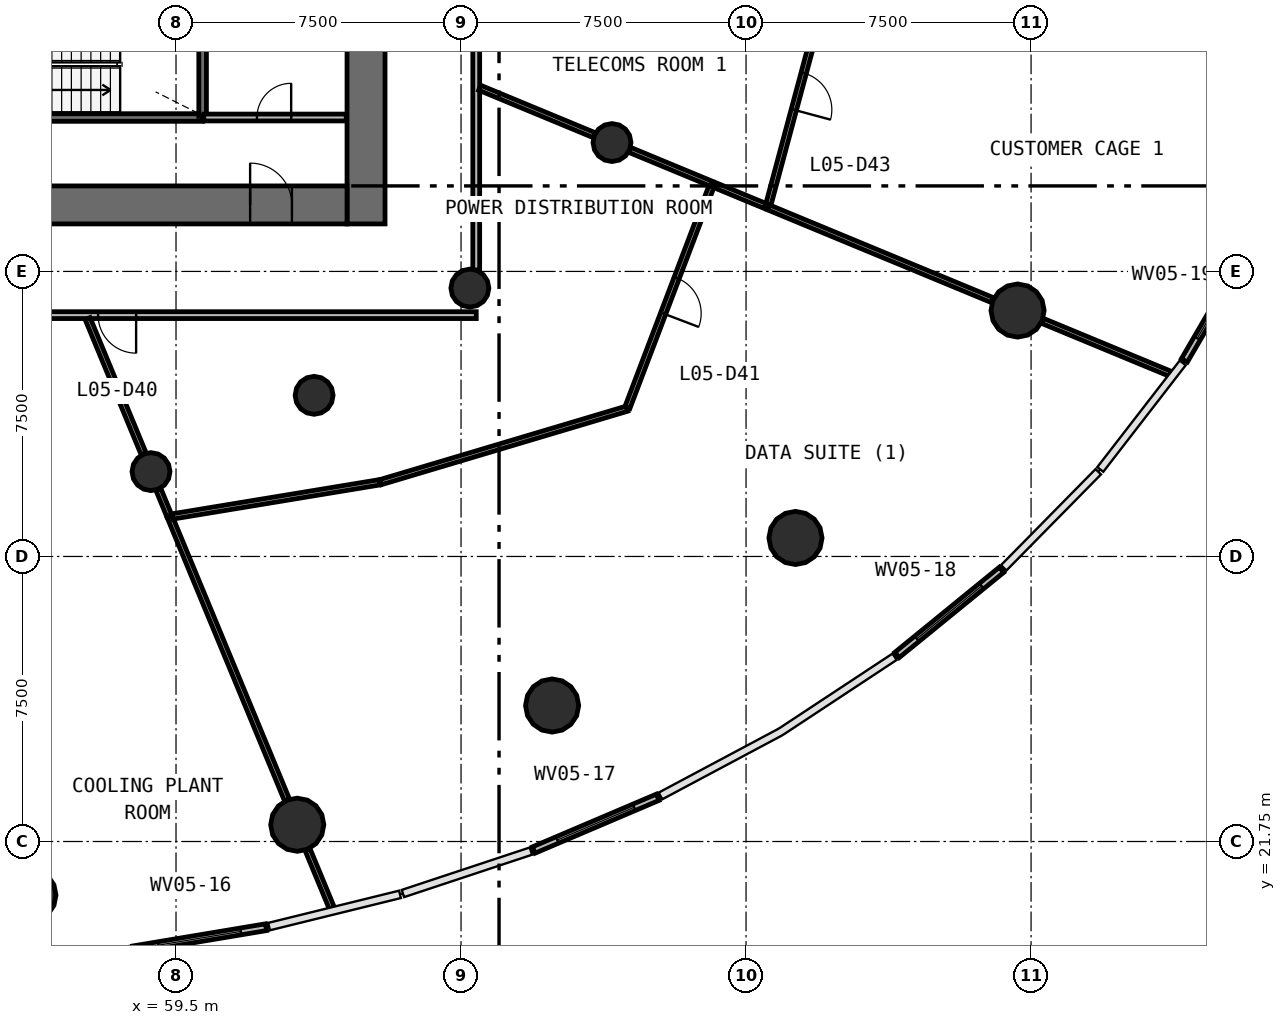
"""IFC4 building model, lengths in metres.
Left out: names, types, materials, properties, quantities, classifications, styles, units other than length and angle.
Written with IfcOpenShell. Run it as: python <this file> out.ifc"""

import sys

from ifc_helpers import new_model, si_unit, direction, frame, frame_2d, origin, origin_2d, place, context, subcontext, project, spatial, rectangle, circle, extrude, source, transform, mapped, element, fill, save


model = new_model("IFC4")
c1 = context("Model", 3, precision=1e-05, world=origin(), true_north=direction((0.0, 1.0)))
c2 = subcontext(c1, "Body", "Model", "MODEL_VIEW")
j1 = project(units=[si_unit("LENGTHUNIT", "METRE"), si_unit("PLANEANGLEUNIT", "RADIAN")], contexts=[c1])
p1 = place(None, origin())
s1 = spatial("IfcSite", under=j1, at=p1, CompositionType="ELEMENT")
p2 = place(p1, origin())
s2 = spatial("IfcBuilding", under=s1, at=p2, CompositionType="ELEMENT")
p3 = place(p2, frame((0.0, 0.0, 22.6)))
s3 = spatial("IfcBuildingStorey", under=s2, at=p3, CompositionType="ELEMENT", Elevation=22.6)
p4 = place(p3, frame((64.5, 38.0, 0.0), z_axis=(0.0, 0.0, 1.0), x_axis=(0.0, 1.0, 0.0)))
e1 = element("IfcWall", 1, at=p4, inside=s3, PredefinedType="SHEAR", context=c2, shape_type="SweptSolid", body=[
    extrude(rectangle(XDim=20.0, YDim=1.0, at=frame_2d((10.0, 0.0))), origin(), (0.0, 0.0, 1.0), 4.4),
])
p5 = place(p4, frame((9.1, 0.0, 0.0)))
e2 = element("IfcOpeningElement", 2, at=p5, cuts=e1, PredefinedType="OPENING", context=c2, shape_type="SweptSolid", body=[
    extrude(rectangle(XDim=1.8, YDim=2.1, at=frame_2d((0.9, 1.05))), frame((0.0, 0.51, 0.0), z_axis=(0.0, -1.0, 0.0), x_axis=(1.0, 0.0, 0.0)), (0.0, 0.0, 1.0), 1.02),
])
p6 = place(p3, frame((40.0, 38.5, 0.0), z_axis=(0.0, 0.0, 1.0), x_axis=(1.0, 0.0, 0.0)))
e3 = element("IfcWall", 3, at=p6, inside=s3, PredefinedType="SHEAR", context=c2, shape_type="SweptSolid", body=[
    extrude(rectangle(XDim=24.0, YDim=1.0, at=frame_2d((12.0, 0.0))), origin(), (0.0, 0.0, 1.0), 4.4),
])
p7 = place(p6, frame((21.45, 0.0, 0.0)))
e4 = element("IfcOpeningElement", 4, at=p7, cuts=e3, PredefinedType="OPENING", context=c2, shape_type="SweptSolid", body=[
    extrude(rectangle(XDim=1.1, YDim=2.1, at=frame_2d((0.55, 1.05))), frame((0.0, 0.51, 0.0), z_axis=(0.0, -1.0, 0.0), x_axis=(1.0, 0.0, 0.0)), (0.0, 0.0, 1.0), 1.02),
])
p8 = place(p6, frame((1.95, 0.0, 0.0)))
e5 = element("IfcOpeningElement", 5, at=p8, cuts=e3, PredefinedType="OPENING", context=c2, shape_type="SweptSolid", body=[
    extrude(rectangle(XDim=1.1, YDim=2.1, at=frame_2d((0.55, 1.05))), frame((0.0, 0.51, 0.0), z_axis=(0.0, -1.0, 0.0), x_axis=(1.0, 0.0, 0.0)), (0.0, 0.0, 1.0), 1.02),
])
m1 = source(origin(), c2, "Body", "SweptSolid", [
    extrude(circle(Radius=0.7, at=origin_2d()), origin(), (0.0, 0.0, 1.0), 4.4),
])
for number, where, z_axis, x_axis in (
    (6, (55.642, 20.339, 0.0), (0.0, 0.0, 1.0), (1.0, 0.0, 0.0)),
    (7, (62.69, 22.191, 0.0), (0.0, 0.0, 1.0), (1.0, 0.0, 0.0)),
    (8, (69.396, 25.328, 0.0), (0.0, 0.0, 1.0), (1.0, 0.0, 0.0)),
    (9, (75.801, 29.737, 0.0), (0.0, 0.0, 1.0), (1.0, 0.0, 0.0)),
    (10, (81.645, 35.721, 0.0), (0.0, 0.0, 1.0), (1.0, 0.0, 0.0)),
):
    element("IfcColumn", number, at=place(p3, frame(where, z_axis=z_axis, x_axis=x_axis)), inside=s3, PredefinedType="COLUMN", context=c2, shape_type="MappedRepresentation", body=[
        mapped(m1, transform((0.0, 0.0, 0.0), scale=1.0)),
    ])
m2 = source(origin(), c2, "Body", "SweptSolid", [
    extrude(circle(Radius=0.5, at=origin_2d()), origin(), (0.0, 0.0, 1.0), 4.4),
])
for number, where, z_axis, x_axis in (
    (11, (58.842, 31.482, 0.0), (0.0, 0.0, 1.0), (1.0, 0.0, 0.0)),
    (12, (63.134, 33.49, 0.0), (0.0, 0.0, 1.0), (1.0, 0.0, 0.0)),
    (13, (67.232, 36.312, 0.0), (0.0, 0.0, 1.0), (1.0, 0.0, 0.0)),
    (14, (70.972, 40.141, 0.0), (0.0, 0.0, 1.0), (1.0, 0.0, 0.0)),
):
    element("IfcColumn", number, at=place(p3, frame(where, z_axis=z_axis, x_axis=x_axis)), inside=s3, PredefinedType="COLUMN", context=c2, shape_type="MappedRepresentation", body=[
        mapped(m2, transform((0.0, 0.0, 0.0), scale=1.0)),
    ])
p9 = place(p3, frame((58.372, 18.912, 0.0), z_axis=(0.0, 0.0, 1.0), x_axis=(0.986367870411, 0.164555231521, 0.0)))
e15 = element("IfcWall", 15, at=p9, inside=s3, PredefinedType="STANDARD", context=c2, shape_type="SweptSolid", body=[
    extrude(rectangle(XDim=3.547, YDim=0.18, at=frame_2d((1.774, 0.0))), origin(), (0.0, 0.0, 1.0), 3.95),
])
p10 = place(p9, frame((0.674, 0.0, 0.9)))
e16 = element("IfcOpeningElement", 16, at=p10, cuts=e15, PredefinedType="OPENING", context=c2, shape_type="SweptSolid", body=[
    extrude(rectangle(XDim=2.2, YDim=2.2, at=frame_2d((1.1, 1.1))), frame((0.0, 0.1, 0.0), z_axis=(0.0, -1.0, 0.0), x_axis=(1.0, 0.0, 0.0)), (0.0, 0.0, 1.0), 0.2),
])
p11 = place(p3, frame((68.912, 21.525, 0.0), z_axis=(0.0, 0.0, 1.0), x_axis=(0.920153052776, 0.391558883779, 0.0)))
e17 = element("IfcWall", 17, at=p11, inside=s3, PredefinedType="STANDARD", context=c2, shape_type="SweptSolid", body=[
    extrude(rectangle(XDim=3.547, YDim=0.18, at=frame_2d((1.773, 0.0))), origin(), (0.0, 0.0, 1.0), 3.95),
])
p12 = place(p11, frame((0.674, 0.0, 0.9)))
e18 = element("IfcOpeningElement", 18, at=p12, cuts=e17, PredefinedType="OPENING", context=c2, shape_type="SweptSolid", body=[
    extrude(rectangle(XDim=2.2, YDim=2.2, at=frame_2d((1.1, 1.1))), frame((0.0, 0.1, 0.0), z_axis=(0.0, -1.0, 0.0), x_axis=(1.0, 0.0, 0.0)), (0.0, 0.0, 1.0), 0.2),
])
p13 = place(p3, frame((78.472, 26.658, 0.0), z_axis=(0.0, 0.0, 1.0), x_axis=(0.775283676783, 0.631613188997, 0.0)))
e19 = element("IfcWall", 19, at=p13, inside=s3, PredefinedType="STANDARD", context=c2, shape_type="SweptSolid", body=[
    extrude(rectangle(XDim=3.546, YDim=0.18, at=frame_2d((1.773, 0.0))), origin(), (0.0, 0.0, 1.0), 3.95),
])
p14 = place(p13, frame((0.673, 0.0, 0.9)))
e20 = element("IfcOpeningElement", 20, at=p14, cuts=e19, PredefinedType="OPENING", context=c2, shape_type="SweptSolid", body=[
    extrude(rectangle(XDim=2.2, YDim=2.2, at=frame_2d((1.1, 1.1))), frame((0.0, 0.1, 0.0), z_axis=(0.0, -1.0, 0.0), x_axis=(1.0, 0.0, 0.0)), (0.0, 0.0, 1.0), 0.2),
])
p15 = place(p3, frame((86.035, 34.41, 0.0), z_axis=(0.0, 0.0, 1.0), x_axis=(0.503905275905, 0.8637589206, 0.0)))
e21 = element("IfcWall", 21, at=p15, inside=s3, PredefinedType="STANDARD", context=c2, shape_type="SweptSolid", body=[
    extrude(rectangle(XDim=3.546, YDim=0.18, at=frame_2d((1.773, 0.0))), origin(), (0.0, 0.0, 1.0), 3.95),
])
p16 = place(p15, frame((0.673, 0.0, 0.9)))
e22 = element("IfcOpeningElement", 22, at=p16, cuts=e21, PredefinedType="OPENING", context=c2, shape_type="SweptSolid", body=[
    extrude(rectangle(XDim=2.2, YDim=2.2, at=frame_2d((1.1, 1.1))), frame((0.0, 0.1, 0.0), z_axis=(0.0, -1.0, 0.0), x_axis=(1.0, 0.0, 0.0)), (0.0, 0.0, 1.0), 0.2),
])
p17 = place(p3, frame((53.6, 40.8, 0.0), z_axis=(0.0, 0.0, 1.0), x_axis=(1.0, 0.0, 0.0)))
e23 = element("IfcWall", 23, at=p17, inside=s3, PredefinedType="SOLIDWALL", context=c2, shape_type="SweptSolid", body=[
    extrude(rectangle(XDim=6.6, YDim=0.2, at=frame_2d((3.3, 0.0))), origin(), (0.0, 0.0, 1.0), 3.95),
])
p18 = place(p17, frame((0.3, 0.0, 0.0)))
e24 = element("IfcOpeningElement", 24, at=p18, cuts=e23, PredefinedType="OPENING", context=c2, shape_type="SweptSolid", body=[
    extrude(rectangle(XDim=1.2, YDim=2.1, at=frame_2d((0.6, 1.05))), frame((0.0, 0.11, 0.0), z_axis=(0.0, -1.0, 0.0), x_axis=(1.0, 0.0, 0.0)), (0.0, 0.0, 1.0), 0.22),
])
p19 = place(p3, frame((60.2, 40.83, 0.0), z_axis=(0.0, 0.0, 1.0), x_axis=(0.0, 1.0, 0.0)))
e25 = element("IfcWall", 25, at=p19, inside=s3, PredefinedType="SOLIDWALL", context=c2, shape_type="SweptSolid", body=[
    extrude(rectangle(XDim=2.77, YDim=0.2, at=frame_2d((1.385, 0.0))), origin(), (0.0, 0.0, 1.0), 3.95),
])
p20 = place(p3, frame((67.4, 35.6, 0.0), z_axis=(0.0, 0.0, 1.0), x_axis=(-1.0, 0.0, 0.0)))
e26 = element("IfcWall", 26, at=p20, inside=s3, PredefinedType="PARTITIONING", context=c2, shape_type="SweptSolid", body=[
    extrude(rectangle(XDim=30.8, YDim=0.18, at=frame_2d((15.4, 0.0))), origin(), (0.0, 0.0, 1.0), 3.05),
])
p21 = place(p20, frame((14.95, 0.0, 0.0)))
e27 = element("IfcOpeningElement", 27, at=p21, cuts=e26, PredefinedType="OPENING", context=c2, shape_type="SweptSolid", body=[
    extrude(rectangle(XDim=1.0, YDim=2.1, at=frame_2d((0.5, 1.05))), frame((0.0, 0.1, 0.0), z_axis=(0.0, -1.0, 0.0), x_axis=(1.0, 0.0, 0.0)), (0.0, 0.0, 1.0), 0.2),
])
p22 = place(p20, frame((12.55, 0.0, 0.0)))
e28 = element("IfcOpeningElement", 28, at=p22, cuts=e26, PredefinedType="OPENING", context=c2, shape_type="SweptSolid", body=[
    extrude(rectangle(XDim=1.0, YDim=2.1, at=frame_2d((0.5, 1.05))), frame((0.0, 0.1, 0.0), z_axis=(0.0, -1.0, 0.0), x_axis=(1.0, 0.0, 0.0)), (0.0, 0.0, 1.0), 0.2),
])
p23 = place(p20, frame((8.95, 0.0, 0.0)))
e29 = element("IfcOpeningElement", 29, at=p23, cuts=e26, PredefinedType="OPENING", context=c2, shape_type="SweptSolid", body=[
    extrude(rectangle(XDim=1.0, YDim=2.1, at=frame_2d((0.5, 1.05))), frame((0.0, 0.1, 0.0), z_axis=(0.0, -1.0, 0.0), x_axis=(1.0, 0.0, 0.0)), (0.0, 0.0, 1.0), 0.2),
])
p24 = place(p3, frame((67.4, 60.37, 0.0), z_axis=(0.0, 0.0, 1.0), x_axis=(0.0, -1.0, 0.0)))
e30 = element("IfcWall", 30, at=p24, inside=s3, PredefinedType="PARTITIONING", context=c2, shape_type="SweptSolid", body=[
    extrude(rectangle(XDim=23.583, YDim=0.18, at=frame_2d((11.791, 0.0))), origin(), (0.0, 0.0, 1.0), 3.05),
])
p25 = place(p24, frame((11.333, 0.0, 0.0)))
e31 = element("IfcOpeningElement", 31, at=p25, cuts=e30, PredefinedType="OPENING", context=c2, shape_type="SweptSolid", body=[
    extrude(rectangle(XDim=1.0, YDim=2.1, at=frame_2d((0.5, 1.05))), frame((0.0, 0.1, 0.0), z_axis=(0.0, -1.0, 0.0), x_axis=(1.0, 0.0, 0.0)), (0.0, 0.0, 1.0), 0.2),
])
p26 = place(p24, frame((4.633, 0.0, 0.0)))
e32 = element("IfcOpeningElement", 32, at=p26, cuts=e30, PredefinedType="OPENING", context=c2, shape_type="SweptSolid", body=[
    extrude(rectangle(XDim=0.9, YDim=2.1, at=frame_2d((0.45, 1.05))), frame((0.0, 0.1, 0.0), z_axis=(0.0, -1.0, 0.0), x_axis=(1.0, 0.0, 0.0)), (0.0, 0.0, 1.0), 0.2),
])
p27 = place(p24, frame((1.232, 0.0, 0.0)))
e33 = element("IfcOpeningElement", 33, at=p27, cuts=e30, PredefinedType="OPENING", context=c2, shape_type="SweptSolid", body=[
    extrude(rectangle(XDim=0.9, YDim=2.1, at=frame_2d((0.45, 1.05))), frame((0.0, 0.1, 0.0), z_axis=(0.0, -1.0, 0.0), x_axis=(1.0, 0.0, 0.0)), (0.0, 0.0, 1.0), 0.2),
])
p28 = place(p24, frame((14.732, 0.0, 0.0)))
e34 = element("IfcOpeningElement", 34, at=p28, cuts=e30, PredefinedType="OPENING", context=c2, shape_type="SweptSolid", body=[
    extrude(rectangle(XDim=1.0, YDim=2.1, at=frame_2d((0.5, 1.05))), frame((0.0, 0.1, 0.0), z_axis=(0.0, -1.0, 0.0), x_axis=(1.0, 0.0, 0.0)), (0.0, 0.0, 1.0), 0.2),
])
p29 = place(p3, frame((60.23, 40.8, 0.0), z_axis=(0.0, 0.0, 1.0), x_axis=(1.0, 0.0, 0.0)))
e35 = element("IfcWall", 35, at=p29, inside=s3, PredefinedType="PARTITIONING", context=c2, shape_type="SweptSolid", body=[
    extrude(rectangle(XDim=3.75, YDim=0.18, at=frame_2d((1.875, 0.0))), origin(), (0.0, 0.0, 1.0), 3.95),
])
p30 = place(p29, frame((1.4, 0.0, 0.0)))
e36 = element("IfcOpeningElement", 36, at=p30, cuts=e35, PredefinedType="OPENING", context=c2, shape_type="SweptSolid", body=[
    extrude(rectangle(XDim=0.9, YDim=2.1, at=frame_2d((0.45, 1.05))), frame((0.0, 0.1, 0.0), z_axis=(0.0, -1.0, 0.0), x_axis=(1.0, 0.0, 0.0)), (0.0, 0.0, 1.0), 0.2),
])
p31 = place(p3, frame((59.335, 30.291, 0.0), z_axis=(0.0, 0.0, 1.0), x_axis=(0.38267718825, -0.923882118884, 0.0)))
e37 = element("IfcWall", 37, at=p31, inside=s3, PredefinedType="PARTITIONING", context=c2, shape_type="SweptSolid", body=[
    extrude(rectangle(XDim=8.062, YDim=0.14, at=frame_2d((4.031, 0.0))), origin(), (0.0, 0.0, 1.0), 3.05),
])
p32 = place(p3, frame((64.886, 31.206, 0.0), z_axis=(0.0, 0.0, 1.0), x_axis=(0.958287066923, 0.285807448063, 0.0)))
e38 = element("IfcWall", 38, at=p32, inside=s3, PredefinedType="PARTITIONING", context=c2, shape_type="SweptSolid", body=[
    extrude(rectangle(XDim=6.763, YDim=0.14, at=frame_2d((3.381, 0.0))), origin(), (0.0, 0.0, 1.0), 3.05),
])
p33 = place(p3, frame((76.754, 44.711, 0.0), z_axis=(0.0, 0.0, 1.0), x_axis=(-0.259521453513, -0.965737342742, 0.0)))
e39 = element("IfcWall", 39, at=p33, inside=s3, PredefinedType="PARTITIONING", context=c2, shape_type="SweptSolid", body=[
    extrude(rectangle(XDim=6.489, YDim=0.14, at=frame_2d((3.245, 0.0))), origin(), (0.0, 0.0, 1.0), 3.05),
])
p34 = place(p33, frame((2.839, 0.0, 0.0)))
e40 = element("IfcOpeningElement", 40, at=p34, cuts=e39, PredefinedType="OPENING", context=c2, shape_type="SweptSolid", body=[
    extrude(rectangle(XDim=1.0, YDim=2.1, at=frame_2d((0.5, 1.05))), frame((0.0, 0.08, 0.0), z_axis=(0.0, -1.0, 0.0), x_axis=(1.0, 0.0, 0.0)), (0.0, 0.0, 1.0), 0.16),
])
p35 = place(p3, frame((75.097, 38.433, 0.0), z_axis=(0.0, 0.0, 1.0), x_axis=(0.923869490045, -0.382707676125, 0.0)))
e41 = element("IfcWall", 41, at=p35, inside=s3, PredefinedType="PARTITIONING", context=c2, shape_type="SweptSolid", body=[
    extrude(rectangle(XDim=6.382, YDim=0.14, at=frame_2d((3.191, 0.0))), origin(), (0.0, 0.0, 1.0), 3.05),
])
p36 = place(p3, frame((73.613, 39.048, 0.0), z_axis=(0.0, 0.0, 1.0), x_axis=(-0.355249637072, -0.934771466916, 0.0)))
e42 = element("IfcWall", 42, at=p36, inside=s3, PredefinedType="PARTITIONING", context=c2, shape_type="SweptSolid", body=[
    extrude(rectangle(XDim=6.291, YDim=0.14, at=frame_2d((3.146, 0.0))), origin(), (0.0, 0.0, 1.0), 3.05),
])
p37 = place(p36, frame((2.641, 0.0, 0.0)))
e43 = element("IfcOpeningElement", 43, at=p37, cuts=e42, PredefinedType="OPENING", context=c2, shape_type="SweptSolid", body=[
    extrude(rectangle(XDim=1.0, YDim=2.1, at=frame_2d((0.5, 1.05))), frame((0.0, 0.08, 0.0), z_axis=(0.0, -1.0, 0.0), x_axis=(1.0, 0.0, 0.0)), (0.0, 0.0, 1.0), 0.16),
])
p38 = place(p3, frame((59.406, 30.303, 0.0), z_axis=(0.0, 0.0, 1.0), x_axis=(0.986685012905, 0.162642815117, 0.0)))
e44 = element("IfcWall", 44, at=p38, inside=s3, PredefinedType="PARTITIONING", context=c2, shape_type="SweptSolid", body=[
    extrude(rectangle(XDim=5.524, YDim=0.14, at=frame_2d((2.762, 0.0))), origin(), (0.0, 0.0, 1.0), 3.05),
])
p39 = place(p3, frame((57.174, 35.51, 0.0), z_axis=(0.0, 0.0, 1.0), x_axis=(0.382644558062, -0.923895633817, 0.0)))
e45 = element("IfcWall", 45, at=p39, inside=s3, PredefinedType="PARTITIONING", context=c2, shape_type="SweptSolid", body=[
    extrude(rectangle(XDim=3.854, YDim=0.14, at=frame_2d((1.927, 0.0))), origin(), (0.0, 0.0, 1.0), 3.05),
])
p40 = place(p3, frame((82.296, 35.451, 0.0), z_axis=(0.0, 0.0, 1.0), x_axis=(0.923882033439, -0.382677394537, 0.0)))
e46 = element("IfcWall", 46, at=p40, inside=s3, PredefinedType="PARTITIONING", context=c2, shape_type="SweptSolid", body=[
    extrude(rectangle(XDim=3.642, YDim=0.14, at=frame_2d((1.821, 0.0))), origin(), (0.0, 0.0, 1.0), 3.05),
])
p41 = place(p3, frame((67.49, 41.584, 0.0), z_axis=(0.0, 0.0, 1.0), x_axis=(0.923911109142, -0.382607190737, 0.0)))
e47 = element("IfcWall", 47, at=p41, inside=s3, PredefinedType="PARTITIONING", context=c2, shape_type="SweptSolid", body=[
    extrude(rectangle(XDim=3.264, YDim=0.14, at=frame_2d((1.632, 0.0))), origin(), (0.0, 0.0, 1.0), 3.05),
])
p42 = place(p3, frame((71.439, 39.948, 0.0), z_axis=(0.0, 0.0, 1.0), x_axis=(0.923861804277, -0.382726229306, 0.0)))
e48 = element("IfcWall", 48, at=p42, inside=s3, PredefinedType="PARTITIONING", context=c2, shape_type="SweptSolid", body=[
    extrude(rectangle(XDim=2.323, YDim=0.14, at=frame_2d((1.161, 0.0))), origin(), (0.0, 0.0, 1.0), 3.05),
])
p43 = place(p3, frame((62.96, 21.54, 0.0), z_axis=(0.0, 0.0, 1.0), x_axis=(0.382571117301, -0.923926046936, 0.0)))
e49 = element("IfcWall", 49, at=p43, inside=s3, PredefinedType="PARTITIONING", context=c2, shape_type="SweptSolid", body=[
    extrude(rectangle(XDim=1.671, YDim=0.14, at=frame_2d((0.836, 0.0))), origin(), (0.0, 0.0, 1.0), 3.05),
])
p44 = place(p3, frame((73.677, 39.021, 0.0), z_axis=(0.0, 0.0, 1.0), x_axis=(0.923859397542, -0.382732038864, 0.0)))
e50 = element("IfcWall", 50, at=p44, inside=s3, PredefinedType="PARTITIONING", context=c2, shape_type="SweptSolid", body=[
    extrude(rectangle(XDim=1.437, YDim=0.14, at=frame_2d((0.718, 0.0))), origin(), (0.0, 0.0, 1.0), 3.05),
])
p45 = place(p3, frame((59.035, 31.016, 0.0), z_axis=(0.0, 0.0, 1.0), x_axis=(0.382799508823, -0.923831443525, 0.0)))
e51 = element("IfcWall", 51, at=p45, inside=s3, PredefinedType="PARTITIONING", context=c2, shape_type="SweptSolid", body=[
    extrude(rectangle(XDim=0.754, YDim=0.14, at=frame_2d((0.377, 0.0))), origin(), (0.0, 0.0, 1.0), 3.05),
])
m3 = source(origin(), c2, "Body", "SweptSolid", [
    extrude(rectangle(XDim=2.2, YDim=2.2, at=frame_2d((1.1, 1.1))), frame((0.0, 0.03, 0.0), z_axis=(0.0, -1.0, 0.0), x_axis=(1.0, 0.0, 0.0)), (0.0, 0.0, 1.0), 0.06),
])
p46 = place(p10, origin())
e52 = element("IfcWindow", 52, at=p46, inside=s3, PartitioningType="SINGLE_PANEL", PredefinedType="WINDOW", context=c2, shape_type="MappedRepresentation", body=[
    mapped(m3, transform((0.0, 0.0, 0.0), scale=1.0)),
])
fill(e16, e52)
p47 = place(p12, origin())
e53 = element("IfcWindow", 53, at=p47, inside=s3, PartitioningType="SINGLE_PANEL", PredefinedType="WINDOW", context=c2, shape_type="MappedRepresentation", body=[
    mapped(m3, transform((0.0, 0.0, 0.0), scale=1.0)),
])
fill(e18, e53)
p48 = place(p14, origin())
e54 = element("IfcWindow", 54, at=p48, inside=s3, PartitioningType="SINGLE_PANEL", PredefinedType="WINDOW", context=c2, shape_type="MappedRepresentation", body=[
    mapped(m3, transform((0.0, 0.0, 0.0), scale=1.0)),
])
fill(e20, e54)
p49 = place(p16, origin())
e55 = element("IfcWindow", 55, at=p49, inside=s3, PartitioningType="SINGLE_PANEL", PredefinedType="WINDOW", context=c2, shape_type="MappedRepresentation", body=[
    mapped(m3, transform((0.0, 0.0, 0.0), scale=1.0)),
])
fill(e22, e55)
m4 = source(origin(), c2, "Body", "SweptSolid", [
    extrude(rectangle(XDim=1.1, YDim=2.1, at=frame_2d((0.55, 1.05))), frame((0.0, 0.025, 0.0), z_axis=(0.0, -1.0, 0.0), x_axis=(1.0, 0.0, 0.0)), (0.0, 0.0, 1.0), 0.05),
])
p50 = place(p7, origin())
e56 = element("IfcDoor", 56, at=p50, inside=s3, OperationType="SINGLE_SWING_LEFT", PredefinedType="DOOR", context=c2, shape_type="MappedRepresentation", body=[
    mapped(m4, transform((0.0, 0.0, 0.0), scale=1.0)),
])
fill(e4, e56)
m5 = source(origin(), c2, "Body", "SweptSolid", [
    extrude(rectangle(XDim=1.0, YDim=2.1, at=frame_2d((0.5, 1.05))), frame((0.0, 0.025, 0.0), z_axis=(0.0, -1.0, 0.0), x_axis=(1.0, 0.0, 0.0)), (0.0, 0.0, 1.0), 0.05),
])
p51 = place(p23, origin())
e57 = element("IfcDoor", 57, at=p51, inside=s3, OperationType="SINGLE_SWING_LEFT", PredefinedType="DOOR", context=c2, shape_type="MappedRepresentation", body=[
    mapped(m5, transform((0.0, 0.0, 0.0), scale=1.0)),
])
fill(e29, e57)
p52 = place(p37, origin())
e58 = element("IfcDoor", 58, at=p52, inside=s3, OperationType="SINGLE_SWING_RIGHT", PredefinedType="DOOR", context=c2, shape_type="MappedRepresentation", body=[
    mapped(m5, transform((0.0, 0.0, 0.0), scale=1.0)),
])
fill(e43, e58)
p53 = place(p34, origin())
e59 = element("IfcDoor", 59, at=p53, inside=s3, OperationType="SINGLE_SWING_RIGHT", PredefinedType="DOOR", context=c2, shape_type="MappedRepresentation", body=[
    mapped(m5, transform((0.0, 0.0, 0.0), scale=1.0)),
])
fill(e40, e59)
m6 = source(origin(), c2, "Body", "SweptSolid", [
    extrude(rectangle(XDim=0.9, YDim=2.1, at=frame_2d((0.45, 1.05))), frame((0.0, 0.025, 0.0), z_axis=(0.0, -1.0, 0.0), x_axis=(1.0, 0.0, 0.0)), (0.0, 0.0, 1.0), 0.05),
])
p54 = place(p30, origin())
e60 = element("IfcDoor", 60, at=p54, inside=s3, OperationType="SINGLE_SWING_RIGHT", PredefinedType="DOOR", context=c2, shape_type="MappedRepresentation", body=[
    mapped(m6, transform((0.0, 0.0, 0.0), scale=1.0)),
])
fill(e36, e60)
save(model, sys.argv[1])
